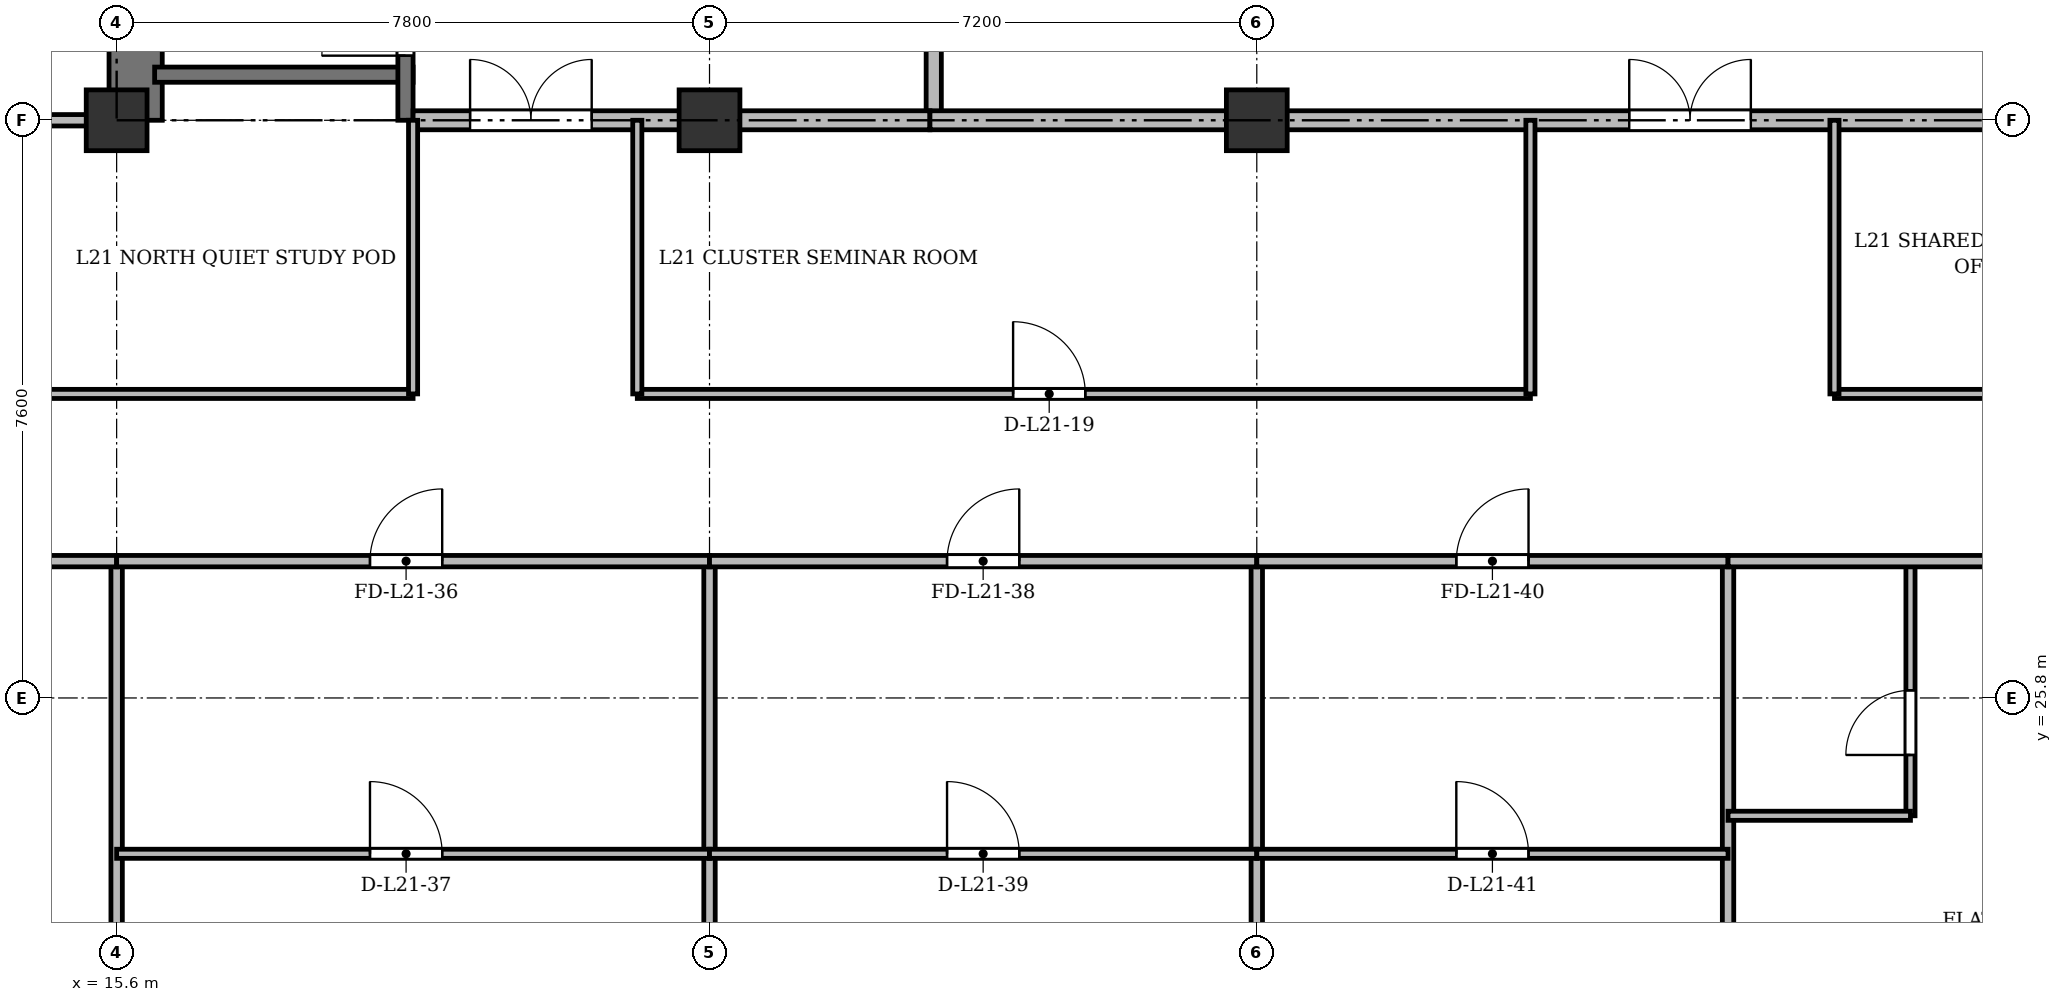
"""IFC4 building model, lengths in metres.
Left out: names, types, materials, properties, quantities, classifications, styles, units other than length and angle.
Written with IfcOpenShell. Run it as: python <this file> out.ifc"""

import sys

from ifc_helpers import new_model, si_unit, direction, frame, frame_2d, origin, origin_2d, place, context, subcontext, project, spatial, rectangle, extrude, source, transform, mapped, element, fill, save


model = new_model("IFC4")
c1 = context("Model", 3, precision=1e-05, world=origin(), true_north=direction((0.0, 1.0)))
c2 = subcontext(c1, "Body", "Model", "MODEL_VIEW")
j1 = project(units=[si_unit("LENGTHUNIT", "METRE"), si_unit("PLANEANGLEUNIT", "RADIAN")], contexts=[c1])
p1 = place(None, origin())
s1 = spatial("IfcSite", under=j1, at=p1, CompositionType="ELEMENT")
p2 = place(p1, origin())
s2 = spatial("IfcBuilding", under=s1, at=p2, CompositionType="ELEMENT")
p3 = place(p2, frame((0.0, 0.0, 85.3)))
s3 = spatial("IfcBuildingStorey", under=s2, at=p3, CompositionType="ELEMENT", Elevation=85.3)
m1 = source(origin(), c2, "Body", "SweptSolid", [
    extrude(rectangle(XDim=0.8, YDim=0.8, at=origin_2d()), origin(), (0.0, 0.0, 1.0), 3.6),
])
for number, where, z_axis, x_axis in (
    (1, (15.6, 33.4, 0.0), (0.0, 0.0, 1.0), (1.0, 0.0, 0.0)),
    (2, (23.4, 33.4, 0.0), (0.0, 0.0, 1.0), (1.0, 0.0, 0.0)),
    (3, (30.6, 33.4, 0.0), (0.0, 0.0, 1.0), (1.0, 0.0, 0.0)),
):
    element("IfcColumn", number, at=place(p3, frame(where, z_axis=z_axis, x_axis=x_axis)), inside=s3, PredefinedType="COLUMN", context=c2, shape_type="MappedRepresentation", body=[
        mapped(m1, transform((0.0, 0.0, 0.0), x_axis=(1.0, 0.0, 0.0), y_axis=(0.0, 1.0, 0.0), z_axis=(0.0, 0.0, 1.0), scale=1.0)),
    ])
p4 = place(p3, frame((15.85, 33.4, 0.0), z_axis=(0.0, 0.0, 1.0), x_axis=(0.0, 1.0, 0.0)))
e4 = element("IfcWall", 4, at=p4, inside=s3, PredefinedType="SHEAR", context=c2, shape_type="SweptSolid", body=[
    extrude(rectangle(XDim=11.7, YDim=0.7, at=frame_2d((5.85, 0.0))), origin(), (0.0, 0.0, 1.0), 3.34),
])
p5 = place(p3, frame((16.1, 34.0, 0.0), z_axis=(0.0, 0.0, 1.0), x_axis=(1.0, 0.0, 0.0)))
e5 = element("IfcWall", 5, at=p5, inside=s3, PredefinedType="SHEAR", context=c2, shape_type="SweptSolid", body=[
    extrude(rectangle(XDim=3.4, YDim=0.2, at=frame_2d((1.7, 0.0))), origin(), (0.0, 0.0, 1.0), 3.34),
])
p6 = place(p3, frame((19.4, 33.4, 0.0), z_axis=(0.0, 0.0, 1.0), x_axis=(0.0, 1.0, 0.0)))
e6 = element("IfcWall", 6, at=p6, inside=s3, PredefinedType="SHEAR", context=c2, shape_type="SweptSolid", body=[
    extrude(rectangle(XDim=11.1, YDim=0.2, at=frame_2d((5.55, 0.0))), origin(), (0.0, 0.0, 1.0), 3.34),
])
p7 = place(p6, frame((0.85, 0.0, 0.0)))
e7 = element("IfcOpeningElement", 7, at=p7, cuts=e6, PredefinedType="OPENING", context=c2, shape_type="SweptSolid", body=[
    extrude(rectangle(XDim=1.1, YDim=2.15, at=frame_2d((0.55, 1.075))), frame((0.0, 0.11, 0.0), z_axis=(0.0, -1.0, 0.0), x_axis=(1.0, 0.0, 0.0)), (0.0, 0.0, 1.0), 0.22),
])
p8 = place(p3, frame((26.35, 33.4, 0.0), z_axis=(0.0, 0.0, 1.0), x_axis=(0.0, 1.0, 0.0)))
e8 = element("IfcWall", 8, at=p8, inside=s3, PredefinedType="SOLIDWALL", context=c2, shape_type="SweptSolid", body=[
    extrude(rectangle(XDim=11.3, YDim=0.2, at=frame_2d((5.65, 0.0))), origin(), (0.0, 0.0, 1.0), 2.752),
])
p9 = place(p3, frame((19.5, 33.4, 0.0), z_axis=(0.0, 0.0, 1.0), x_axis=(1.0, 0.0, 0.0)))
e9 = element("IfcWall", 9, at=p9, inside=s3, PredefinedType="PARTITIONING", context=c2, shape_type="SweptSolid", body=[
    extrude(rectangle(XDim=6.8, YDim=0.25, at=frame_2d((3.4, 0.0))), origin(), (0.0, 0.0, 1.0), 2.752),
])
p10 = place(p9, frame((0.75, 0.0, 0.0)))
e10 = element("IfcOpeningElement", 10, at=p10, cuts=e9, PredefinedType="OPENING", context=c2, shape_type="SweptSolid", body=[
    extrude(rectangle(XDim=1.6, YDim=2.2, at=frame_2d((0.8, 1.1))), frame((0.0, 0.135, 0.0), z_axis=(0.0, -1.0, 0.0), x_axis=(1.0, 0.0, 0.0)), (0.0, 0.0, 1.0), 0.27),
])
p11 = place(p3, frame((26.3, 33.4, 0.0), z_axis=(0.0, 0.0, 1.0), x_axis=(1.0, 0.0, 0.0)))
e11 = element("IfcWall", 11, at=p11, inside=s3, PredefinedType="PARTITIONING", context=c2, shape_type="SweptSolid", body=[
    extrude(rectangle(XDim=20.85, YDim=0.25, at=frame_2d((10.425, 0.0))), origin(), (0.0, 0.0, 1.0), 2.752),
])
p12 = place(p11, frame((9.2, 0.0, 0.0)))
e12 = element("IfcOpeningElement", 12, at=p12, cuts=e11, PredefinedType="OPENING", context=c2, shape_type="SweptSolid", body=[
    extrude(rectangle(XDim=1.6, YDim=2.2, at=frame_2d((0.8, 1.1))), frame((0.0, 0.135, 0.0), z_axis=(0.0, -1.0, 0.0), x_axis=(1.0, 0.0, 0.0)), (0.0, 0.0, 1.0), 0.27),
])
p13 = place(p3, frame((4.75, 29.8, 0.0), z_axis=(0.0, 0.0, 1.0), x_axis=(1.0, 0.0, 0.0)))
e13 = element("IfcWall", 13, at=p13, inside=s3, PredefinedType="PARTITIONING", context=c2, shape_type="SweptSolid", body=[
    extrude(rectangle(XDim=14.75, YDim=0.12, at=frame_2d((7.375, 0.0))), origin(), (0.0, 0.0, 1.0), 2.84),
])
p14 = place(p13, frame((6.9, 0.0, 0.0)))
e14 = element("IfcOpeningElement", 14, at=p14, cuts=e13, PredefinedType="OPENING", context=c2, shape_type="SweptSolid", body=[
    extrude(rectangle(XDim=0.95, YDim=2.15, at=frame_2d((0.475, 1.075))), frame((0.0, 0.07, 0.0), z_axis=(0.0, -1.0, 0.0), x_axis=(1.0, 0.0, 0.0)), (0.0, 0.0, 1.0), 0.14),
])
p15 = place(p3, frame((22.45, 29.8, 0.0), z_axis=(0.0, 0.0, 1.0), x_axis=(1.0, 0.0, 0.0)))
e15 = element("IfcWall", 15, at=p15, inside=s3, PredefinedType="PARTITIONING", context=c2, shape_type="SweptSolid", body=[
    extrude(rectangle(XDim=11.75, YDim=0.12, at=frame_2d((5.875, 0.0))), origin(), (0.0, 0.0, 1.0), 2.84),
])
p16 = place(p15, frame((4.944, 0.0, 0.0)))
e16 = element("IfcOpeningElement", 16, at=p16, cuts=e15, PredefinedType="OPENING", context=c2, shape_type="SweptSolid", body=[
    extrude(rectangle(XDim=0.95, YDim=2.15, at=frame_2d((0.475, 1.075))), frame((0.0, 0.07, 0.0), z_axis=(0.0, -1.0, 0.0), x_axis=(1.0, 0.0, 0.0)), (0.0, 0.0, 1.0), 0.14),
])
p17 = place(p3, frame((38.2, 29.8, 0.0), z_axis=(0.0, 0.0, 1.0), x_axis=(1.0, 0.0, 0.0)))
e17 = element("IfcWall", 17, at=p17, inside=s3, PredefinedType="PARTITIONING", context=c2, shape_type="SweptSolid", body=[
    extrude(rectangle(XDim=8.6, YDim=0.12, at=frame_2d((4.3, 0.0))), origin(), (0.0, 0.0, 1.0), 2.84),
])
p18 = place(p17, frame((3.462, 0.0, 0.0)))
e18 = element("IfcOpeningElement", 18, at=p18, cuts=e17, PredefinedType="OPENING", context=c2, shape_type="SweptSolid", body=[
    extrude(rectangle(XDim=0.95, YDim=2.15, at=frame_2d((0.475, 1.075))), frame((0.0, 0.07, 0.0), z_axis=(0.0, -1.0, 0.0), x_axis=(1.0, 0.0, 0.0)), (0.0, 0.0, 1.0), 0.14),
])
for number, where, z_axis, x_axis in (
    (19, (19.5, 29.8, 0.0), (0.0, 0.0, 1.0), (0.0, 1.0, 0.0)),
    (20, (22.45, 29.8, 0.0), (0.0, 0.0, 1.0), (0.0, 1.0, 0.0)),
    (21, (34.2, 29.8, 0.0), (0.0, 0.0, 1.0), (0.0, 1.0, 0.0)),
    (22, (38.2, 29.8, 0.0), (0.0, 0.0, 1.0), (0.0, 1.0, 0.0)),
):
    element("IfcWall", number, at=place(p3, frame(where, z_axis=z_axis, x_axis=x_axis)), inside=s3, PredefinedType="PARTITIONING", context=c2, shape_type="SweptSolid", body=[
        extrude(rectangle(XDim=3.6, YDim=0.12, at=frame_2d((1.8, 0.0))), origin(), (0.0, 0.0, 1.0), 2.752),
    ])
p19 = place(p3, frame((4.75, 33.4, 0.0), z_axis=(0.0, 0.0, 1.0), x_axis=(1.0, 0.0, 0.0)))
e23 = element("IfcWall", 23, at=p19, inside=s3, PredefinedType="PARTITIONING", context=c2, shape_type="SweptSolid", body=[
    extrude(rectangle(XDim=10.85, YDim=0.15, at=frame_2d((5.425, 0.0))), origin(), (0.0, 0.0, 1.0), 2.752),
])
p20 = place(p19, frame((4.94, 0.0, 0.0)))
e24 = element("IfcOpeningElement", 24, at=p20, cuts=e23, PredefinedType="OPENING", context=c2, shape_type="SweptSolid", body=[
    extrude(rectangle(XDim=0.95, YDim=2.15, at=frame_2d((0.475, 1.075))), frame((0.0, 0.085, 0.0), z_axis=(0.0, -1.0, 0.0), x_axis=(1.0, 0.0, 0.0)), (0.0, 0.0, 1.0), 0.17),
])
for number, where, z_axis, x_axis in (
    (25, (15.6, 3.145, 0.0), (0.0, 0.0, 1.0), (0.0, 1.0, 0.0)),
    (26, (23.4, 3.145, 0.0), (0.0, 0.0, 1.0), (0.0, 1.0, 0.0)),
    (27, (30.6, 3.145, 0.0), (0.0, 0.0, 1.0), (0.0, 1.0, 0.0)),
):
    element("IfcWall", number, at=place(p3, frame(where, z_axis=z_axis, x_axis=x_axis)), inside=s3, PredefinedType="PARTITIONING", context=c2, shape_type="SweptSolid", body=[
        extrude(rectangle(XDim=24.455, YDim=0.15, at=frame_2d((12.228, 0.0))), origin(), (0.0, 0.0, 1.0), 2.84),
    ])
p21 = place(p3, frame((36.8, 3.145, 0.0), z_axis=(0.0, 0.0, 1.0), x_axis=(0.0, 1.0, 0.0)))
e28 = element("IfcWall", 28, at=p21, inside=s3, PredefinedType="PARTITIONING", context=c2, shape_type="SweptSolid", body=[
    extrude(rectangle(XDim=24.455, YDim=0.15, at=frame_2d((12.228, 0.0))), origin(), (0.0, 0.0, 1.0), 2.752),
])
p22 = place(p3, frame((10.6, 27.6, 0.0), z_axis=(0.0, 0.0, 1.0), x_axis=(1.0, 0.0, 0.0)))
e29 = element("IfcWall", 29, at=p22, inside=s3, PredefinedType="PARTITIONING", context=c2, shape_type="SweptSolid", body=[
    extrude(rectangle(XDim=5.0, YDim=0.15, at=frame_2d((2.5, 0.0))), origin(), (0.0, 0.0, 1.0), 2.84),
])
p23 = place(p22, frame((2.025, 0.0, 0.0)))
e30 = element("IfcOpeningElement", 30, at=p23, cuts=e29, PredefinedType="OPENING", context=c2, shape_type="SweptSolid", body=[
    extrude(rectangle(XDim=0.95, YDim=2.15, at=frame_2d((0.475, 1.075))), frame((0.0, 0.085, 0.0), z_axis=(0.0, -1.0, 0.0), x_axis=(1.0, 0.0, 0.0)), (0.0, 0.0, 1.0), 0.17),
])
p24 = place(p3, frame((15.6, 27.6, 0.0), z_axis=(0.0, 0.0, 1.0), x_axis=(1.0, 0.0, 0.0)))
e31 = element("IfcWall", 31, at=p24, inside=s3, PredefinedType="PARTITIONING", context=c2, shape_type="SweptSolid", body=[
    extrude(rectangle(XDim=7.8, YDim=0.15, at=frame_2d((3.9, 0.0))), origin(), (0.0, 0.0, 1.0), 2.84),
])
p25 = place(p24, frame((3.333, 0.0, 0.0)))
e32 = element("IfcOpeningElement", 32, at=p25, cuts=e31, PredefinedType="OPENING", context=c2, shape_type="SweptSolid", body=[
    extrude(rectangle(XDim=0.95, YDim=2.15, at=frame_2d((0.475, 1.075))), frame((0.0, 0.085, 0.0), z_axis=(0.0, -1.0, 0.0), x_axis=(1.0, 0.0, 0.0)), (0.0, 0.0, 1.0), 0.17),
])
p26 = place(p3, frame((15.6, 23.75, 0.0), z_axis=(0.0, 0.0, 1.0), x_axis=(1.0, 0.0, 0.0)))
e33 = element("IfcWall", 33, at=p26, inside=s3, PredefinedType="PARTITIONING", context=c2, shape_type="SweptSolid", body=[
    extrude(rectangle(XDim=7.8, YDim=0.12, at=frame_2d((3.9, 0.0))), origin(), (0.0, 0.0, 1.0), 2.84),
])
p27 = place(p26, frame((3.333, 0.0, 0.0)))
e34 = element("IfcOpeningElement", 34, at=p27, cuts=e33, PredefinedType="OPENING", context=c2, shape_type="SweptSolid", body=[
    extrude(rectangle(XDim=0.95, YDim=2.15, at=frame_2d((0.475, 1.075))), frame((0.0, 0.07, 0.0), z_axis=(0.0, -1.0, 0.0), x_axis=(1.0, 0.0, 0.0)), (0.0, 0.0, 1.0), 0.14),
])
p28 = place(p3, frame((23.4, 27.6, 0.0), z_axis=(0.0, 0.0, 1.0), x_axis=(1.0, 0.0, 0.0)))
e35 = element("IfcWall", 35, at=p28, inside=s3, PredefinedType="PARTITIONING", context=c2, shape_type="SweptSolid", body=[
    extrude(rectangle(XDim=7.2, YDim=0.15, at=frame_2d((3.6, 0.0))), origin(), (0.0, 0.0, 1.0), 2.84),
])
p29 = place(p28, frame((3.125, 0.0, 0.0)))
e36 = element("IfcOpeningElement", 36, at=p29, cuts=e35, PredefinedType="OPENING", context=c2, shape_type="SweptSolid", body=[
    extrude(rectangle(XDim=0.95, YDim=2.15, at=frame_2d((0.475, 1.075))), frame((0.0, 0.085, 0.0), z_axis=(0.0, -1.0, 0.0), x_axis=(1.0, 0.0, 0.0)), (0.0, 0.0, 1.0), 0.17),
])
p30 = place(p3, frame((23.4, 23.75, 0.0), z_axis=(0.0, 0.0, 1.0), x_axis=(1.0, 0.0, 0.0)))
e37 = element("IfcWall", 37, at=p30, inside=s3, PredefinedType="PARTITIONING", context=c2, shape_type="SweptSolid", body=[
    extrude(rectangle(XDim=7.2, YDim=0.12, at=frame_2d((3.6, 0.0))), origin(), (0.0, 0.0, 1.0), 2.84),
])
p31 = place(p30, frame((3.125, 0.0, 0.0)))
e38 = element("IfcOpeningElement", 38, at=p31, cuts=e37, PredefinedType="OPENING", context=c2, shape_type="SweptSolid", body=[
    extrude(rectangle(XDim=0.95, YDim=2.15, at=frame_2d((0.475, 1.075))), frame((0.0, 0.07, 0.0), z_axis=(0.0, -1.0, 0.0), x_axis=(1.0, 0.0, 0.0)), (0.0, 0.0, 1.0), 0.14),
])
p32 = place(p3, frame((30.6, 27.6, 0.0), z_axis=(0.0, 0.0, 1.0), x_axis=(1.0, 0.0, 0.0)))
e39 = element("IfcWall", 39, at=p32, inside=s3, PredefinedType="PARTITIONING", context=c2, shape_type="SweptSolid", body=[
    extrude(rectangle(XDim=6.2, YDim=0.15, at=frame_2d((3.1, 0.0))), origin(), (0.0, 0.0, 1.0), 2.84),
])
p33 = place(p32, frame((2.625, 0.0, 0.0)))
e40 = element("IfcOpeningElement", 40, at=p33, cuts=e39, PredefinedType="OPENING", context=c2, shape_type="SweptSolid", body=[
    extrude(rectangle(XDim=0.95, YDim=2.15, at=frame_2d((0.475, 1.075))), frame((0.0, 0.085, 0.0), z_axis=(0.0, -1.0, 0.0), x_axis=(1.0, 0.0, 0.0)), (0.0, 0.0, 1.0), 0.17),
])
p34 = place(p3, frame((30.6, 23.75, 0.0), z_axis=(0.0, 0.0, 1.0), x_axis=(1.0, 0.0, 0.0)))
e41 = element("IfcWall", 41, at=p34, inside=s3, PredefinedType="PARTITIONING", context=c2, shape_type="SweptSolid", body=[
    extrude(rectangle(XDim=6.2, YDim=0.12, at=frame_2d((3.1, 0.0))), origin(), (0.0, 0.0, 1.0), 2.84),
])
p35 = place(p34, frame((2.625, 0.0, 0.0)))
e42 = element("IfcOpeningElement", 42, at=p35, cuts=e41, PredefinedType="OPENING", context=c2, shape_type="SweptSolid", body=[
    extrude(rectangle(XDim=0.95, YDim=2.15, at=frame_2d((0.475, 1.075))), frame((0.0, 0.07, 0.0), z_axis=(0.0, -1.0, 0.0), x_axis=(1.0, 0.0, 0.0)), (0.0, 0.0, 1.0), 0.14),
])
p36 = place(p3, frame((39.2, 24.25, 0.0), z_axis=(0.0, 0.0, 1.0), x_axis=(0.0, 1.0, 0.0)))
e43 = element("IfcWall", 43, at=p36, inside=s3, PredefinedType="PARTITIONING", context=c2, shape_type="SweptSolid", body=[
    extrude(rectangle(XDim=3.35, YDim=0.12, at=frame_2d((1.675, 0.0))), origin(), (0.0, 0.0, 1.0), 2.99),
])
p37 = place(p36, frame((0.8, 0.0, 0.0)))
e44 = element("IfcOpeningElement", 44, at=p37, cuts=e43, PredefinedType="OPENING", context=c2, shape_type="SweptSolid", body=[
    extrude(rectangle(XDim=0.85, YDim=2.1, at=frame_2d((0.425, 1.05))), frame((0.0, 0.07, 0.0), z_axis=(0.0, -1.0, 0.0), x_axis=(1.0, 0.0, 0.0)), (0.0, 0.0, 1.0), 0.14),
])
p38 = place(p3, frame((36.8, 24.25, 0.0), z_axis=(0.0, 0.0, 1.0), x_axis=(1.0, 0.0, 0.0)))
e45 = element("IfcWall", 45, at=p38, inside=s3, PredefinedType="PARTITIONING", context=c2, shape_type="SweptSolid", body=[
    extrude(rectangle(XDim=2.4, YDim=0.12, at=frame_2d((1.2, 0.0))), origin(), (0.0, 0.0, 1.0), 3.34),
])
p39 = place(p3, frame((36.8, 27.6, 0.0), z_axis=(0.0, 0.0, 1.0), x_axis=(1.0, 0.0, 0.0)))
e46 = element("IfcWall", 46, at=p39, inside=s3, PredefinedType="PARTITIONING", context=c2, shape_type="SweptSolid", body=[
    extrude(rectangle(XDim=7.0, YDim=0.15, at=frame_2d((3.5, 0.0))), origin(), (0.0, 0.0, 1.0), 2.84),
])
p40 = place(p39, frame((4.7, 0.0, 0.0)))
e47 = element("IfcOpeningElement", 47, at=p40, cuts=e46, PredefinedType="OPENING", context=c2, shape_type="SweptSolid", body=[
    extrude(rectangle(XDim=0.95, YDim=2.15, at=frame_2d((0.475, 1.075))), frame((0.0, 0.085, 0.0), z_axis=(0.0, -1.0, 0.0), x_axis=(1.0, 0.0, 0.0)), (0.0, 0.0, 1.0), 0.17),
])
m2 = source(origin(), c2, "Body", "SweptSolid", [
    extrude(rectangle(XDim=1.1, YDim=2.15, at=frame_2d((0.55, 1.075))), frame((0.0, 0.025, 0.0), z_axis=(0.0, -1.0, 0.0), x_axis=(1.0, 0.0, 0.0)), (0.0, 0.0, 1.0), 0.05),
])
p41 = place(p7, origin())
e48 = element("IfcDoor", 48, at=p41, inside=s3, OperationType="SINGLE_SWING_LEFT", PredefinedType="DOOR", context=c2, shape_type="MappedRepresentation", body=[
    mapped(m2, transform((0.0, 0.0, 0.0), x_axis=(1.0, 0.0, 0.0), y_axis=(0.0, 1.0, 0.0), z_axis=(0.0, 0.0, 1.0), scale=1.0)),
])
fill(e7, e48)
m3 = source(origin(), c2, "Body", "SweptSolid", [
    extrude(rectangle(XDim=1.6, YDim=2.2, at=frame_2d((0.8, 1.1))), frame((0.0, 0.025, 0.0), z_axis=(0.0, -1.0, 0.0), x_axis=(1.0, 0.0, 0.0)), (0.0, 0.0, 1.0), 0.05),
])
p42 = place(p10, origin())
e49 = element("IfcDoor", 49, at=p42, inside=s3, OperationType="DOUBLE_DOOR_SINGLE_SWING", PredefinedType="DOOR", context=c2, shape_type="MappedRepresentation", body=[
    mapped(m3, transform((0.0, 0.0, 0.0), x_axis=(1.0, 0.0, 0.0), y_axis=(0.0, 1.0, 0.0), z_axis=(0.0, 0.0, 1.0), scale=1.0)),
])
fill(e10, e49)
p43 = place(p12, origin())
e50 = element("IfcDoor", 50, at=p43, inside=s3, OperationType="DOUBLE_DOOR_SINGLE_SWING", PredefinedType="DOOR", context=c2, shape_type="MappedRepresentation", body=[
    mapped(m3, transform((0.0, 0.0, 0.0), x_axis=(1.0, 0.0, 0.0), y_axis=(0.0, 1.0, 0.0), z_axis=(0.0, 0.0, 1.0), scale=1.0)),
])
fill(e12, e50)
m4 = source(origin(), c2, "Body", "SweptSolid", [
    extrude(rectangle(XDim=0.95, YDim=2.15, at=frame_2d((0.475, 1.075))), frame((0.0, 0.025, 0.0), z_axis=(0.0, -1.0, 0.0), x_axis=(1.0, 0.0, 0.0)), (0.0, 0.0, 1.0), 0.05),
])
p44 = place(p16, origin())
e51 = element("IfcDoor", 51, at=p44, inside=s3, OperationType="SINGLE_SWING_LEFT", PredefinedType="DOOR", context=c2, shape_type="MappedRepresentation", body=[
    mapped(m4, transform((0.0, 0.0, 0.0), x_axis=(1.0, 0.0, 0.0), y_axis=(0.0, 1.0, 0.0), z_axis=(0.0, 0.0, 1.0), scale=1.0)),
])
fill(e16, e51)
p45 = place(p25, origin())
e52 = element("IfcDoor", 52, at=p45, inside=s3, OperationType="SINGLE_SWING_RIGHT", PredefinedType="DOOR", context=c2, shape_type="MappedRepresentation", body=[
    mapped(m4, transform((0.0, 0.0, 0.0), x_axis=(1.0, 0.0, 0.0), y_axis=(0.0, 1.0, 0.0), z_axis=(0.0, 0.0, 1.0), scale=1.0)),
])
fill(e32, e52)
p46 = place(p27, origin())
e53 = element("IfcDoor", 53, at=p46, inside=s3, OperationType="SINGLE_SWING_LEFT", PredefinedType="DOOR", context=c2, shape_type="MappedRepresentation", body=[
    mapped(m4, transform((0.0, 0.0, 0.0), x_axis=(1.0, 0.0, 0.0), y_axis=(0.0, 1.0, 0.0), z_axis=(0.0, 0.0, 1.0), scale=1.0)),
])
fill(e34, e53)
p47 = place(p29, origin())
e54 = element("IfcDoor", 54, at=p47, inside=s3, OperationType="SINGLE_SWING_RIGHT", PredefinedType="DOOR", context=c2, shape_type="MappedRepresentation", body=[
    mapped(m4, transform((0.0, 0.0, 0.0), x_axis=(1.0, 0.0, 0.0), y_axis=(0.0, 1.0, 0.0), z_axis=(0.0, 0.0, 1.0), scale=1.0)),
])
fill(e36, e54)
p48 = place(p31, origin())
e55 = element("IfcDoor", 55, at=p48, inside=s3, OperationType="SINGLE_SWING_LEFT", PredefinedType="DOOR", context=c2, shape_type="MappedRepresentation", body=[
    mapped(m4, transform((0.0, 0.0, 0.0), x_axis=(1.0, 0.0, 0.0), y_axis=(0.0, 1.0, 0.0), z_axis=(0.0, 0.0, 1.0), scale=1.0)),
])
fill(e38, e55)
p49 = place(p33, origin())
e56 = element("IfcDoor", 56, at=p49, inside=s3, OperationType="SINGLE_SWING_RIGHT", PredefinedType="DOOR", context=c2, shape_type="MappedRepresentation", body=[
    mapped(m4, transform((0.0, 0.0, 0.0), x_axis=(1.0, 0.0, 0.0), y_axis=(0.0, 1.0, 0.0), z_axis=(0.0, 0.0, 1.0), scale=1.0)),
])
fill(e40, e56)
p50 = place(p35, origin())
e57 = element("IfcDoor", 57, at=p50, inside=s3, OperationType="SINGLE_SWING_LEFT", PredefinedType="DOOR", context=c2, shape_type="MappedRepresentation", body=[
    mapped(m4, transform((0.0, 0.0, 0.0), x_axis=(1.0, 0.0, 0.0), y_axis=(0.0, 1.0, 0.0), z_axis=(0.0, 0.0, 1.0), scale=1.0)),
])
fill(e42, e57)
m5 = source(origin(), c2, "Body", "SweptSolid", [
    extrude(rectangle(XDim=0.85, YDim=2.1, at=frame_2d((0.425, 1.05))), frame((0.0, 0.025, 0.0), z_axis=(0.0, -1.0, 0.0), x_axis=(1.0, 0.0, 0.0)), (0.0, 0.0, 1.0), 0.05),
])
p51 = place(p37, origin())
e58 = element("IfcDoor", 58, at=p51, inside=s3, OperationType="SINGLE_SWING_LEFT", PredefinedType="DOOR", context=c2, shape_type="MappedRepresentation", body=[
    mapped(m5, transform((0.0, 0.0, 0.0), x_axis=(1.0, 0.0, 0.0), y_axis=(0.0, 1.0, 0.0), z_axis=(0.0, 0.0, 1.0), scale=1.0)),
])
fill(e44, e58)
save(model, sys.argv[1])
